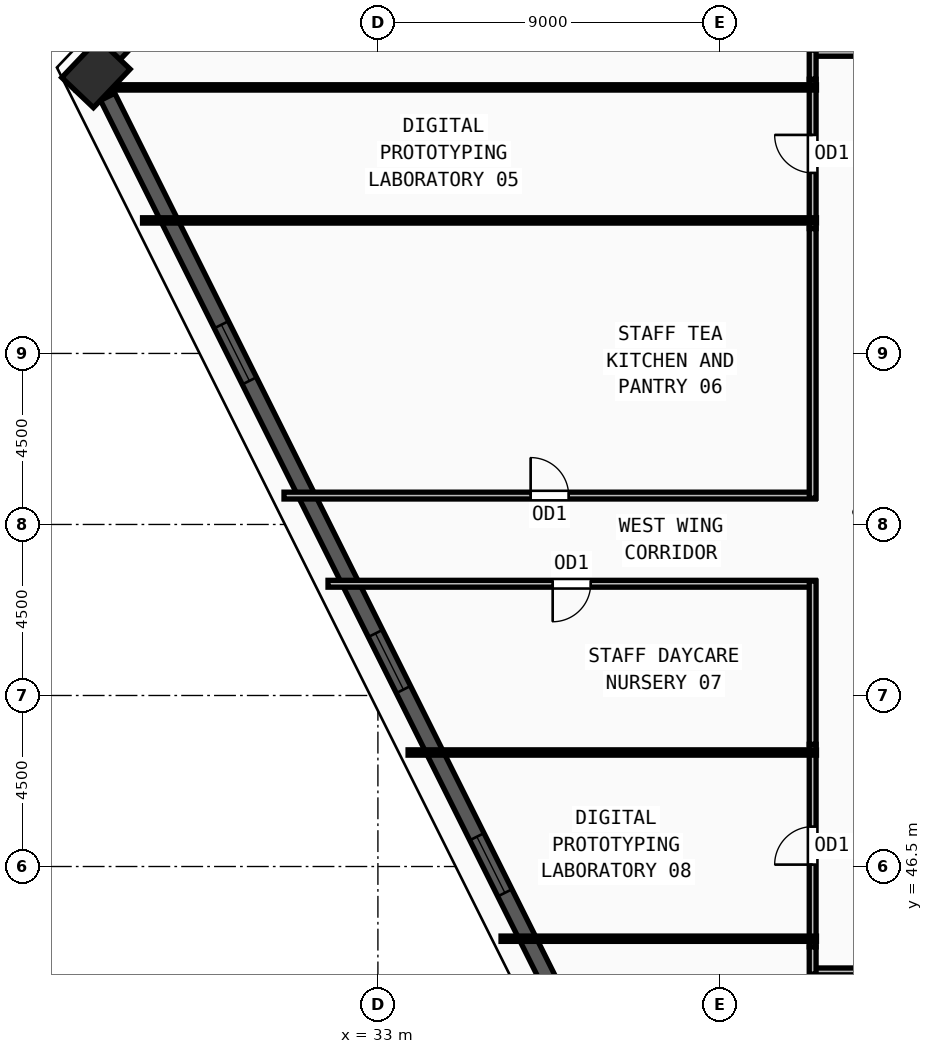
"""IFC4 building model, lengths in metres.
Left out: names, types, materials, properties, quantities, classifications, styles, units other than length and angle.
Written with IfcOpenShell. Run it as: python <this file> out.ifc"""

import sys

from ifc_helpers import new_model, si_unit, direction, frame, frame_2d, origin, origin_2d, place, context, subcontext, project, spatial, rectangle, extrude, source, transform, mapped, element, fill, save


model = new_model("IFC4")
c1 = context("Model", 3, precision=1e-05, world=origin(), true_north=direction((0.0, 1.0)))
c2 = subcontext(c1, "Body", "Model", "MODEL_VIEW")
j1 = project(units=[si_unit("LENGTHUNIT", "METRE"), si_unit("PLANEANGLEUNIT", "RADIAN")], contexts=[c1])
p1 = place(None, origin())
s1 = spatial("IfcSite", under=j1, at=p1, CompositionType="ELEMENT")
p2 = place(p1, origin())
s2 = spatial("IfcBuilding", under=s1, at=p2, CompositionType="ELEMENT")
p3 = place(p2, frame((0.0, 0.0, 177.75)))
s3 = spatial("IfcBuildingStorey", under=s2, at=p3, CompositionType="ELEMENT", Elevation=177.75)
m1 = source(origin(), c2, "Body", "SweptSolid", [
    extrude(rectangle(XDim=1.4, YDim=1.15, at=origin_2d()), origin(), (0.0, 0.0, 1.0), 3.75),
])
p4 = place(p3, frame((25.58, 67.37, 0.0), z_axis=(0.0, 0.0, 1.0), x_axis=(0.68936671806, 0.724412539946, 0.0)))
e1 = element("IfcColumn", 1, at=p4, inside=s3, PredefinedType="COLUMN", context=c2, shape_type="MappedRepresentation", body=[
    mapped(m1, transform((0.0, 0.0, 0.0), x_axis=(1.0, 0.0, 0.0), y_axis=(0.0, 1.0, 0.0), z_axis=(0.0, 0.0, 1.0), scale=1.0)),
])
p5 = place(p3, frame((29.097, 71.067, 0.0), z_axis=(0.0, 0.0, 1.0), x_axis=(-0.689235021259, -0.724537842676, 0.0)))
e2 = element("IfcWall", 2, at=p5, inside=s3, PredefinedType="SOLIDWALL", context=c2, shape_type="SweptSolid", body=[
    extrude(rectangle(XDim=4.412, YDim=0.42, at=frame_2d((2.206, 0.0))), origin(), (0.0, 0.0, 1.0), 3.57),
])
m2 = source(origin(), c2, "Body", "SweptSolid", [
    extrude(rectangle(XDim=1.2, YDim=1.9, at=frame_2d((0.6, 0.95))), frame((0.0, 0.22, 0.0), z_axis=(0.0, -1.0, 0.0), x_axis=(1.0, 0.0, 0.0)), (0.0, 0.0, 1.0), 0.44),
])
p6 = place(p5, frame((1.606, 0.0, 0.55)))
e3 = element("IfcOpeningElement", 3, at=p6, cuts=e2, PredefinedType="OPENING", context=c2, shape_type="MappedRepresentation", body=[
    mapped(m2, transform((0.0, 0.0, 0.0), x_axis=(1.0, 0.0, 0.0), y_axis=(0.0, 1.0, 0.0), z_axis=(0.0, 0.0, 1.0), scale=1.0)),
])
p7 = place(p3, frame((25.888, 66.753, 0.0), z_axis=(0.0, 0.0, 1.0), x_axis=(0.446538896614, -0.894764222469, 0.0)))
e4 = element("IfcWall", 4, at=p7, inside=s3, PredefinedType="SOLIDWALL", context=c2, shape_type="SweptSolid", body=[
    extrude(rectangle(XDim=30.112, YDim=0.42, at=frame_2d((15.056, 0.0))), origin(), (0.0, 0.0, 1.0), 3.57),
])
m3 = source(origin(), c2, "Body", "SweptSolid", [
    extrude(rectangle(XDim=1.65, YDim=1.95, at=frame_2d((0.825, 0.975))), frame((0.0, 0.22, 0.0), z_axis=(0.0, -1.0, 0.0), x_axis=(1.0, 0.0, 0.0)), (0.0, 0.0, 1.0), 0.44),
])
p8 = place(p7, frame((6.703, 0.0, 0.55)))
e5 = element("IfcOpeningElement", 5, at=p8, cuts=e4, PredefinedType="OPENING", context=c2, shape_type="MappedRepresentation", body=[
    mapped(m3, transform((0.0, 0.0, 0.0), x_axis=(1.0, 0.0, 0.0), y_axis=(0.0, 1.0, 0.0), z_axis=(0.0, 0.0, 1.0), scale=1.0)),
])
p9 = place(p7, frame((15.781, 0.0, 0.55)))
e6 = element("IfcOpeningElement", 6, at=p9, cuts=e4, PredefinedType="OPENING", context=c2, shape_type="MappedRepresentation", body=[
    mapped(m3, transform((0.0, 0.0, 0.0), x_axis=(1.0, 0.0, 0.0), y_axis=(0.0, 1.0, 0.0), z_axis=(0.0, 0.0, 1.0), scale=1.0)),
])
p10 = place(p7, frame((21.759, 0.0, 0.55)))
e7 = element("IfcOpeningElement", 7, at=p10, cuts=e4, PredefinedType="OPENING", context=c2, shape_type="MappedRepresentation", body=[
    mapped(m3, transform((0.0, 0.0, 0.0), x_axis=(1.0, 0.0, 0.0), y_axis=(0.0, 1.0, 0.0), z_axis=(0.0, 0.0, 1.0), scale=1.0)),
])
p11 = place(p3, frame((44.37, 67.91, 0.0), z_axis=(0.0, 0.0, 1.0), x_axis=(1.0, 0.0, 0.0)))
e8 = element("IfcWall", 8, at=p11, inside=s3, PredefinedType="PARTITIONING", context=c2, shape_type="SweptSolid", body=[
    extrude(rectangle(XDim=8.415, YDim=0.18, at=frame_2d((4.208, 0.0))), origin(), (0.0, 0.0, 1.0), 3.57),
])
m4 = source(origin(), c2, "Body", "SweptSolid", [
    extrude(rectangle(XDim=1.5, YDim=2.2, at=frame_2d((0.75, 1.1))), frame((0.0, 0.1, 0.0), z_axis=(0.0, -1.0, 0.0), x_axis=(1.0, 0.0, 0.0)), (0.0, 0.0, 1.0), 0.2),
])
p12 = place(p11, frame((3.457, 0.0, 0.0)))
e9 = element("IfcOpeningElement", 9, at=p12, cuts=e8, PredefinedType="OPENING", context=c2, shape_type="MappedRepresentation", body=[
    mapped(m4, transform((0.0, 0.0, 0.0), x_axis=(1.0, 0.0, 0.0), y_axis=(0.0, 1.0, 0.0), z_axis=(0.0, 0.0, 1.0), scale=1.0)),
])
p13 = place(p3, frame((44.44, 63.285, 0.0), z_axis=(0.0, 0.0, 1.0), x_axis=(0.0, 1.0, 0.0)))
e10 = element("IfcWall", 10, at=p13, inside=s3, PredefinedType="PARTITIONING", context=c2, shape_type="SweptSolid", body=[
    extrude(rectangle(XDim=3.93, YDim=0.18, at=frame_2d((1.965, 0.0))), origin(), (0.0, 0.0, 1.0), 3.57),
])
m5 = source(origin(), c2, "Body", "SweptSolid", [
    extrude(rectangle(XDim=1.0, YDim=2.2, at=frame_2d((0.5, 1.1))), frame((0.0, 0.1, 0.0), z_axis=(0.0, -1.0, 0.0), x_axis=(1.0, 0.0, 0.0)), (0.0, 0.0, 1.0), 0.2),
])
p14 = place(p13, frame((1.465, 0.0, 0.0)))
e11 = element("IfcOpeningElement", 11, at=p14, cuts=e10, PredefinedType="OPENING", context=c2, shape_type="MappedRepresentation", body=[
    mapped(m5, transform((0.0, 0.0, 0.0), x_axis=(1.0, 0.0, 0.0), y_axis=(0.0, 1.0, 0.0), z_axis=(0.0, 0.0, 1.0), scale=1.0)),
])
p15 = place(p3, frame((30.529, 56.26, 0.0), z_axis=(0.0, 0.0, 1.0), x_axis=(1.0, 0.0, 0.0)))
e12 = element("IfcWall", 12, at=p15, inside=s3, PredefinedType="PARTITIONING", context=c2, shape_type="SweptSolid", body=[
    extrude(rectangle(XDim=13.981, YDim=0.18, at=frame_2d((6.99, 0.0))), origin(), (0.0, 0.0, 1.0), 3.57),
])
p16 = place(p15, frame((6.49, 0.0, 0.0)))
e13 = element("IfcOpeningElement", 13, at=p16, cuts=e12, PredefinedType="OPENING", context=c2, shape_type="MappedRepresentation", body=[
    mapped(m5, transform((0.0, 0.0, 0.0), x_axis=(1.0, 0.0, 0.0), y_axis=(0.0, 1.0, 0.0), z_axis=(0.0, 0.0, 1.0), scale=1.0)),
])
p17 = place(p3, frame((44.51, 53.94, 0.0), z_axis=(0.0, 0.0, 1.0), x_axis=(-1.0, 0.0, 0.0)))
e14 = element("IfcWall", 14, at=p17, inside=s3, PredefinedType="PARTITIONING", context=c2, shape_type="SweptSolid", body=[
    extrude(rectangle(XDim=12.823, YDim=0.18, at=frame_2d((6.412, 0.0))), origin(), (0.0, 0.0, 1.0), 3.57),
])
p18 = place(p17, frame((5.911, 0.0, 0.0)))
e15 = element("IfcOpeningElement", 15, at=p18, cuts=e14, PredefinedType="OPENING", context=c2, shape_type="MappedRepresentation", body=[
    mapped(m5, transform((0.0, 0.0, 0.0), x_axis=(1.0, 0.0, 0.0), y_axis=(0.0, 1.0, 0.0), z_axis=(0.0, 0.0, 1.0), scale=1.0)),
])
p19 = place(p3, frame((44.44, 44.385, 0.0), z_axis=(0.0, 0.0, 1.0), x_axis=(0.0, 1.0, 0.0)))
e16 = element("IfcWall", 16, at=p19, inside=s3, PredefinedType="PARTITIONING", context=c2, shape_type="SweptSolid", body=[
    extrude(rectangle(XDim=5.33, YDim=0.18, at=frame_2d((2.665, 0.0))), origin(), (0.0, 0.0, 1.0), 3.57),
])
p20 = place(p19, frame((2.165, 0.0, 0.0)))
e17 = element("IfcOpeningElement", 17, at=p20, cuts=e16, PredefinedType="OPENING", context=c2, shape_type="MappedRepresentation", body=[
    mapped(m5, transform((0.0, 0.0, 0.0), x_axis=(1.0, 0.0, 0.0), y_axis=(0.0, 1.0, 0.0), z_axis=(0.0, 0.0, 1.0), scale=1.0)),
])
p21 = place(p3, frame((54.715, 43.74, 0.0), z_axis=(0.0, 0.0, 1.0), x_axis=(-1.0, 0.0, 0.0)))
e18 = element("IfcWall", 18, at=p21, inside=s3, PredefinedType="PARTITIONING", context=c2, shape_type="SweptSolid", body=[
    extrude(rectangle(XDim=10.345, YDim=0.18, at=frame_2d((5.172, 0.0))), origin(), (0.0, 0.0, 1.0), 3.57),
])
p22 = place(p21, frame((4.423, 0.0, 0.0)))
e19 = element("IfcOpeningElement", 19, at=p22, cuts=e18, PredefinedType="OPENING", context=c2, shape_type="MappedRepresentation", body=[
    mapped(m4, transform((0.0, 0.0, 0.0), x_axis=(1.0, 0.0, 0.0), y_axis=(0.0, 1.0, 0.0), z_axis=(0.0, 0.0, 1.0), scale=1.0)),
])
p23 = place(p3, frame((44.44, 67.215, 0.0), z_axis=(0.0, 0.0, 1.0), x_axis=(0.0, 1.0, 0.0)))
e20 = element("IfcWall", 20, at=p23, inside=s3, PredefinedType="PARTITIONING", context=c2, shape_type="SweptSolid", body=[
    extrude(rectangle(XDim=0.765, YDim=0.18, at=frame_2d((0.382, 0.0))), origin(), (0.0, 0.0, 1.0), 3.57),
])
p24 = place(p3, frame((44.44, 56.19, 0.0), z_axis=(0.0, 0.0, 1.0), x_axis=(0.0, 1.0, 0.0)))
e21 = element("IfcWall", 21, at=p24, inside=s3, PredefinedType="PARTITIONING", context=c2, shape_type="SweptSolid", body=[
    extrude(rectangle(XDim=7.095, YDim=0.18, at=frame_2d((3.547, 0.0))), origin(), (0.0, 0.0, 1.0), 3.57),
])
p25 = place(p3, frame((44.44, 49.715, 0.0), z_axis=(0.0, 0.0, 1.0), x_axis=(0.0, 1.0, 0.0)))
e22 = element("IfcWall", 22, at=p25, inside=s3, PredefinedType="PARTITIONING", context=c2, shape_type="SweptSolid", body=[
    extrude(rectangle(XDim=4.295, YDim=0.18, at=frame_2d((2.147, 0.0))), origin(), (0.0, 0.0, 1.0), 3.57),
])
p26 = place(p3, frame((44.44, 43.67, 0.0), z_axis=(0.0, 0.0, 1.0), x_axis=(0.0, 1.0, 0.0)))
e23 = element("IfcWall", 23, at=p26, inside=s3, PredefinedType="PARTITIONING", context=c2, shape_type="SweptSolid", body=[
    extrude(rectangle(XDim=0.715, YDim=0.18, at=frame_2d((0.357, 0.0))), origin(), (0.0, 0.0, 1.0), 3.57),
])
p27 = place(p3, frame((44.54, 44.6, 0.0), z_axis=(0.0, 0.0, 1.0), x_axis=(-1.0, 0.0, 0.0)))
e24 = element("IfcWall", 24, at=p27, inside=s3, PredefinedType="PARTITIONING", context=c2, shape_type="SweptSolid", body=[
    extrude(rectangle(XDim=8.3, YDim=0.14, at=frame_2d((4.15, 0.0))), origin(), (0.0, 0.0, 1.0), 3.57),
])
p28 = place(p3, frame((44.54, 49.5, 0.0), z_axis=(0.0, 0.0, 1.0), x_axis=(-1.0, 0.0, 0.0)))
e25 = element("IfcWall", 25, at=p28, inside=s3, PredefinedType="PARTITIONING", context=c2, shape_type="SweptSolid", body=[
    extrude(rectangle(XDim=10.746, YDim=0.14, at=frame_2d((5.373, 0.0))), origin(), (0.0, 0.0, 1.0), 3.57),
])
p29 = place(p3, frame((44.54, 63.5, 0.0), z_axis=(0.0, 0.0, 1.0), x_axis=(-1.0, 0.0, 0.0)))
e26 = element("IfcWall", 26, at=p29, inside=s3, PredefinedType="PARTITIONING", context=c2, shape_type="SweptSolid", body=[
    extrude(rectangle(XDim=17.733, YDim=0.14, at=frame_2d((8.867, 0.0))), origin(), (0.0, 0.0, 1.0), 2.755),
])
p30 = place(p3, frame((44.54, 67.0, 0.0), z_axis=(0.0, 0.0, 1.0), x_axis=(-1.0, 0.0, 0.0)))
e27 = element("IfcWall", 27, at=p30, inside=s3, PredefinedType="PARTITIONING", context=c2, shape_type="SweptSolid", body=[
    extrude(rectangle(XDim=19.48, YDim=0.14, at=frame_2d((9.74, 0.0))), origin(), (0.0, 0.0, 1.0), 2.755),
])
m6 = source(origin(), c2, "Body", "SweptSolid", [
    extrude(rectangle(XDim=1.65, YDim=1.95, at=frame_2d((0.825, 0.975))), frame((0.0, 0.03, 0.0), z_axis=(0.0, -1.0, 0.0), x_axis=(1.0, 0.0, 0.0)), (0.0, 0.0, 1.0), 0.06),
])
p31 = place(p8, origin())
e28 = element("IfcWindow", 28, at=p31, inside=s3, PartitioningType="DOUBLE_PANEL_VERTICAL", PredefinedType="WINDOW", context=c2, shape_type="MappedRepresentation", body=[
    mapped(m6, transform((0.0, 0.0, 0.0), x_axis=(1.0, 0.0, 0.0), y_axis=(0.0, 1.0, 0.0), z_axis=(0.0, 0.0, 1.0), scale=1.0)),
])
fill(e5, e28)
p32 = place(p9, origin())
e29 = element("IfcWindow", 29, at=p32, inside=s3, PartitioningType="DOUBLE_PANEL_VERTICAL", PredefinedType="WINDOW", context=c2, shape_type="MappedRepresentation", body=[
    mapped(m6, transform((0.0, 0.0, 0.0), x_axis=(1.0, 0.0, 0.0), y_axis=(0.0, 1.0, 0.0), z_axis=(0.0, 0.0, 1.0), scale=1.0)),
])
fill(e6, e29)
p33 = place(p10, origin())
e30 = element("IfcWindow", 30, at=p33, inside=s3, PartitioningType="DOUBLE_PANEL_VERTICAL", PredefinedType="WINDOW", context=c2, shape_type="MappedRepresentation", body=[
    mapped(m6, transform((0.0, 0.0, 0.0), x_axis=(1.0, 0.0, 0.0), y_axis=(0.0, 1.0, 0.0), z_axis=(0.0, 0.0, 1.0), scale=1.0)),
])
fill(e7, e30)
m7 = source(origin(), c2, "Body", "SweptSolid", [
    extrude(rectangle(XDim=1.0, YDim=2.2, at=frame_2d((0.5, 1.1))), frame((0.0, 0.025, 0.0), z_axis=(0.0, -1.0, 0.0), x_axis=(1.0, 0.0, 0.0)), (0.0, 0.0, 1.0), 0.05),
])
p34 = place(p14, origin())
e31 = element("IfcDoor", 31, at=p34, inside=s3, OperationType="SINGLE_SWING_RIGHT", PredefinedType="DOOR", context=c2, shape_type="MappedRepresentation", body=[
    mapped(m7, transform((0.0, 0.0, 0.0), x_axis=(1.0, 0.0, 0.0), y_axis=(0.0, 1.0, 0.0), z_axis=(0.0, 0.0, 1.0), scale=1.0)),
])
fill(e11, e31)
p35 = place(p16, origin())
e32 = element("IfcDoor", 32, at=p35, inside=s3, OperationType="SINGLE_SWING_LEFT", PredefinedType="DOOR", context=c2, shape_type="MappedRepresentation", body=[
    mapped(m7, transform((0.0, 0.0, 0.0), x_axis=(1.0, 0.0, 0.0), y_axis=(0.0, 1.0, 0.0), z_axis=(0.0, 0.0, 1.0), scale=1.0)),
])
fill(e13, e32)
p36 = place(p18, origin())
e33 = element("IfcDoor", 33, at=p36, inside=s3, OperationType="SINGLE_SWING_RIGHT", PredefinedType="DOOR", context=c2, shape_type="MappedRepresentation", body=[
    mapped(m7, transform((0.0, 0.0, 0.0), x_axis=(1.0, 0.0, 0.0), y_axis=(0.0, 1.0, 0.0), z_axis=(0.0, 0.0, 1.0), scale=1.0)),
])
fill(e15, e33)
p37 = place(p20, origin())
e34 = element("IfcDoor", 34, at=p37, inside=s3, OperationType="SINGLE_SWING_LEFT", PredefinedType="DOOR", context=c2, shape_type="MappedRepresentation", body=[
    mapped(m7, transform((0.0, 0.0, 0.0), x_axis=(1.0, 0.0, 0.0), y_axis=(0.0, 1.0, 0.0), z_axis=(0.0, 0.0, 1.0), scale=1.0)),
])
fill(e17, e34)
save(model, sys.argv[1])
